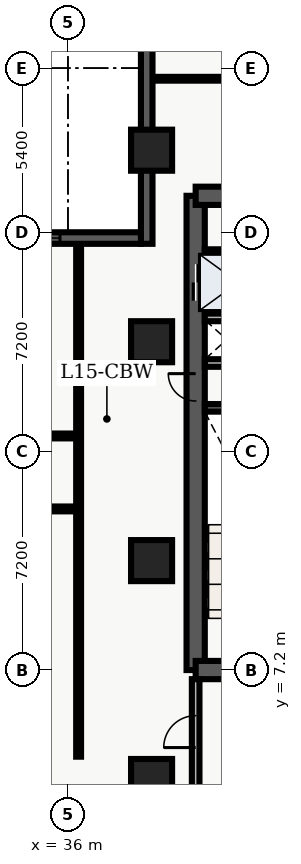
"""IFC4 building model, lengths in metres.
Left out: names, types, materials, properties, quantities, classifications, styles, units other than length and angle.
Written with IfcOpenShell. Run it as: python <this file> out.ifc"""

import sys

from ifc_helpers import new_model, entity, si_unit, converted_unit, direction, frame, origin_with_axes, origin_2d_with_axis, place, context, subcontext, project, spatial, polyline, rectangle, outline, extrude, element, fill, save


model = new_model("IFC4")
c1 = context("Model", 3, precision=1e-05, world=origin_with_axes(), true_north=direction((0.0, 1.0)))
c2 = subcontext(c1, "Body", "Model", "MODEL_VIEW")
j1 = project(units=[si_unit("LENGTHUNIT", "METRE"), converted_unit("PLANEANGLEUNIT", "DEGREE", entity("IfcPlaneAngleMeasure", 0.017), si_unit("PLANEANGLEUNIT", "RADIAN"), dimensions=[0, 0, 0, 0, 0, 0, 0])], contexts=[c1])
p1 = place(None, origin_with_axes())
s1 = spatial("IfcSite", under=j1, at=p1, CompositionType="ELEMENT")
p2 = place(p1, origin_with_axes())
s2 = spatial("IfcBuilding", under=s1, at=p2, CompositionType="ELEMENT")
p3 = place(p2, frame((0.0, 0.0, 63.9), z_axis=(0.0, 0.0, 1.0), x_axis=(1.0, 0.0, 0.0)))
s3 = spatial("IfcBuildingStorey", under=s2, at=p3, CompositionType="ELEMENT", Elevation=63.9)
p4 = place(p3, frame((40.2, 7.2, 0.0), z_axis=(0.0, 0.0, 1.0), x_axis=(0.0, 1.0, 0.0)))
e1 = element("IfcWall", 1, at=p4, inside=s3, PredefinedType="SHEAR", context=c2, shape_type="SweptSolid", body=[
    extrude(outline(polyline([(0.0, -0.3), (15.6, -0.3), (15.6, 0.3), (0.0, 0.3), (0.0, -0.3)])), origin_with_axes(), (0.0, 0.0, 1.0), 3.66),
])
p5 = place(p4, frame((12.75, 0.0, 0.0), z_axis=(0.0, 0.0, 1.0), x_axis=(1.0, 0.0, 0.0)))
e2 = element("IfcOpeningElement", 2, at=p5, cuts=e1, PredefinedType="OPENING", context=c2, shape_type="SweptSolid", body=[
    extrude(rectangle(XDim=1.2, YDim=0.62, at=origin_2d_with_axis()), origin_with_axes(), (0.0, 0.0, 1.0), 2.15),
])
p6 = place(p4, frame((9.3, 0.0, 0.0), z_axis=(0.0, 0.0, 1.0), x_axis=(1.0, 0.0, 0.0)))
e3 = element("IfcOpeningElement", 3, at=p6, cuts=e1, PredefinedType="OPENING", context=c2, shape_type="SweptSolid", body=[
    extrude(rectangle(XDim=0.9, YDim=0.62, at=origin_2d_with_axis()), origin_with_axes(), (0.0, 0.0, 1.0), 2.15),
])
p7 = place(p3, frame((40.2, 7.2, 0.0), z_axis=(0.0, 0.0, 1.0), x_axis=(1.0, 0.0, 0.0)))
e4 = element("IfcWall", 4, at=p7, inside=s3, PredefinedType="SHEAR", context=c2, shape_type="SweptSolid", body=[
    extrude(outline(polyline([(0.0, -0.3), (7.85, -0.3), (7.85, 0.3), (0.0, 0.3), (0.0, -0.3)])), origin_with_axes(), (0.0, 0.0, 1.0), 3.66),
])
p8 = place(p7, frame((2.175, 0.0, 0.0), z_axis=(0.0, 0.0, 1.0), x_axis=(1.0, 0.0, 0.0)))
e5 = element("IfcOpeningElement", 5, at=p8, cuts=e4, PredefinedType="OPENING", context=c2, shape_type="SweptSolid", body=[
    extrude(rectangle(XDim=1.05, YDim=0.62, at=origin_2d_with_axis()), origin_with_axes(), (0.0, 0.0, 1.0), 2.15),
])
p9 = place(p3, frame((40.2, 22.8, 0.0), z_axis=(0.0, 0.0, 1.0), x_axis=(1.0, 0.0, 0.0)))
e6 = element("IfcWall", 6, at=p9, inside=s3, PredefinedType="SHEAR", context=c2, shape_type="SweptSolid", body=[
    extrude(outline(polyline([(0.0, -0.3), (7.85, -0.3), (7.85, 0.3), (0.0, 0.3), (0.0, -0.3)])), origin_with_axes(), (0.0, 0.0, 1.0), 3.66),
])
p10 = place(p9, frame((5.775, 0.0, 0.0), z_axis=(0.0, 0.0, 1.0), x_axis=(1.0, 0.0, 0.0)))
e7 = element("IfcOpeningElement", 7, at=p10, cuts=e6, PredefinedType="OPENING", context=c2, shape_type="SweptSolid", body=[
    extrude(rectangle(XDim=1.05, YDim=0.62, at=origin_2d_with_axis()), origin_with_axes(), (0.0, 0.0, 1.0), 2.15),
])
p11 = place(p9, frame((2.15, 0.0, 0.0), z_axis=(0.0, 0.0, 1.0), x_axis=(1.0, 0.0, 0.0)))
e8 = element("IfcOpeningElement", 8, at=p11, cuts=e6, PredefinedType="OPENING", context=c2, shape_type="SweptSolid", body=[
    extrude(rectangle(XDim=0.9, YDim=0.62, at=origin_2d_with_axis()), origin_with_axes(), (0.0, 0.0, 1.0), 2.15),
])
p12 = place(p3, frame((40.5, 15.825, 0.0), z_axis=(0.0, 0.0, 1.0), x_axis=(1.0, 0.0, 0.0)))
e9 = element("IfcWall", 9, at=p12, inside=s3, PredefinedType="SHEAR", context=c2, shape_type="SweptSolid", body=[
    extrude(outline(polyline([(0.0, -0.125), (3.5, -0.125), (3.5, 0.125), (0.0, 0.125), (0.0, -0.125)])), origin_with_axes(), (0.0, 0.0, 1.0), 3.66),
])
p13 = place(p3, frame((40.5, 17.3, 0.0), z_axis=(0.0, 0.0, 1.0), x_axis=(1.0, 0.0, 0.0)))
e10 = element("IfcWall", 10, at=p13, inside=s3, PredefinedType="SOLIDWALL", context=c2, shape_type="SweptSolid", body=[
    extrude(outline(polyline([(0.0, -0.125), (3.5, -0.125), (3.5, 0.125), (0.0, 0.125), (0.0, -0.125)])), origin_with_axes(), (0.0, 0.0, 1.0), 2.7),
])
p14 = place(p13, frame((2.4, 0.0, 0.0), z_axis=(0.0, 0.0, 1.0), x_axis=(1.0, 0.0, 0.0)))
e11 = element("IfcOpeningElement", 11, at=p14, cuts=e10, PredefinedType="OPENING", context=c2, shape_type="SweptSolid", body=[
    extrude(rectangle(XDim=0.9, YDim=0.27, at=origin_2d_with_axis()), origin_with_axes(), (0.0, 0.0, 1.0), 2.15),
])
p15 = place(p3, frame((40.5, 18.8, 0.0), z_axis=(0.0, 0.0, 1.0), x_axis=(1.0, 0.0, 0.0)))
e12 = element("IfcWall", 12, at=p15, inside=s3, PredefinedType="SOLIDWALL", context=c2, shape_type="SweptSolid", body=[
    extrude(outline(polyline([(0.0, -0.125), (3.5, -0.125), (3.5, 0.125), (0.0, 0.125), (0.0, -0.125)])), origin_with_axes(), (0.0, 0.0, 1.0), 2.7),
])
p16 = place(p3, frame((40.2, 3.1, 0.0), z_axis=(0.0, 0.0, 1.0), x_axis=(0.0, 1.0, 0.0)))
e13 = element("IfcWall", 13, at=p16, inside=s3, PredefinedType="SOLIDWALL", context=c2, shape_type="SweptSolid", body=[
    extrude(outline(polyline([(0.0, -0.125), (3.8, -0.125), (3.8, 0.125), (0.0, 0.125), (0.0, -0.125)])), origin_with_axes(), (0.0, 0.0, 1.0), 2.7),
])
p17 = place(p16, frame((2.075, 0.0, 0.0), z_axis=(0.0, 0.0, 1.0), x_axis=(1.0, 0.0, 0.0)))
e14 = element("IfcOpeningElement", 14, at=p17, cuts=e13, PredefinedType="OPENING", context=c2, shape_type="SweptSolid", body=[
    extrude(rectangle(XDim=1.05, YDim=0.27, at=origin_2d_with_axis()), origin_with_axes(), (0.0, 0.0, 1.0), 2.15),
])
for number, where, z_axis, x_axis in (
    (15, (38.75, 3.6, 0.0), (0.0, 0.0, 1.0), (1.0, 0.0, 0.0)),
    (16, (38.75, 10.8, 0.0), (0.0, 0.0, 1.0), (1.0, 0.0, 0.0)),
    (17, (38.75, 18.0, 0.0), (0.0, 0.0, 1.0), (1.0, 0.0, 0.0)),
    (18, (38.75, 24.3, 0.0), (0.0, 0.0, 1.0), (1.0, 0.0, 0.0)),
):
    element("IfcColumn", number, at=place(p3, frame(where, z_axis=z_axis, x_axis=x_axis)), inside=s3, PredefinedType="COLUMN", context=c2, shape_type="SweptSolid", body=[
        extrude(rectangle(XDim=1.35, YDim=1.35, at=origin_2d_with_axis()), origin_with_axes(), (0.0, 0.0, 1.0), 3.9),
    ])
p18 = place(p3, frame((40.5, 20.96, 0.0), z_axis=(0.0, 0.0, 1.0), x_axis=(1.0, 0.0, 0.0)))
e19 = element("IfcWall", 19, at=p18, inside=s3, PredefinedType="PARTITIONING", context=c2, shape_type="SweptSolid", body=[
    extrude(outline(polyline([(0.0, -0.08), (3.5, -0.08), (3.5, 0.08), (0.0, 0.08), (0.0, -0.08)])), origin_with_axes(), (0.0, 0.0, 1.0), 2.7),
])
p19 = place(p3, frame((21.15, 12.5, 0.0), z_axis=(0.0, 0.0, 1.0), x_axis=(1.0, 0.0, 0.0)))
e20 = element("IfcWall", 20, at=p19, inside=s3, PredefinedType="PARTITIONING", context=c2, shape_type="SweptSolid", body=[
    extrude(outline(polyline([(0.0, -0.08), (15.2, -0.08), (15.2, 0.08), (0.0, 0.08), (0.0, -0.08)])), origin_with_axes(), (0.0, 0.0, 1.0), 2.7),
])
p20 = place(p19, frame((7.65, 0.0, 0.0), z_axis=(0.0, 0.0, 1.0), x_axis=(1.0, 0.0, 0.0)))
e21 = element("IfcOpeningElement", 21, at=p20, cuts=e20, PredefinedType="OPENING", context=c2, shape_type="SweptSolid", body=[
    extrude(rectangle(XDim=1.0, YDim=0.18, at=origin_2d_with_axis()), origin_with_axes(), (0.0, 0.0, 1.0), 2.15),
])
p21 = place(p3, frame((21.15, 14.9, 0.0), z_axis=(0.0, 0.0, 1.0), x_axis=(1.0, 0.0, 0.0)))
e22 = element("IfcWall", 22, at=p21, inside=s3, PredefinedType="PARTITIONING", context=c2, shape_type="SweptSolid", body=[
    extrude(outline(polyline([(0.0, -0.08), (15.2, -0.08), (15.2, 0.08), (0.0, 0.08), (0.0, -0.08)])), origin_with_axes(), (0.0, 0.0, 1.0), 2.7),
])
p22 = place(p21, frame((1.768, 0.0, 0.0), z_axis=(0.0, 0.0, 1.0), x_axis=(1.0, 0.0, 0.0)))
e23 = element("IfcOpeningElement", 23, at=p22, cuts=e22, PredefinedType="OPENING", context=c2, shape_type="SweptSolid", body=[
    extrude(rectangle(XDim=1.0, YDim=0.18, at=origin_2d_with_axis()), origin_with_axes(), (0.0, 0.0, 1.0), 2.15),
])
p23 = place(p21, frame((4.902, 0.0, 0.0), z_axis=(0.0, 0.0, 1.0), x_axis=(1.0, 0.0, 0.0)))
e24 = element("IfcOpeningElement", 24, at=p23, cuts=e22, PredefinedType="OPENING", context=c2, shape_type="SweptSolid", body=[
    extrude(rectangle(XDim=1.0, YDim=0.18, at=origin_2d_with_axis()), origin_with_axes(), (0.0, 0.0, 1.0), 2.15),
])
p24 = place(p21, frame((8.527, 0.0, 0.0), z_axis=(0.0, 0.0, 1.0), x_axis=(1.0, 0.0, 0.0)))
e25 = element("IfcOpeningElement", 25, at=p24, cuts=e22, PredefinedType="OPENING", context=c2, shape_type="SweptSolid", body=[
    extrude(rectangle(XDim=1.0, YDim=0.18, at=origin_2d_with_axis()), origin_with_axes(), (0.0, 0.0, 1.0), 2.15),
])
p25 = place(p21, frame((12.861, 0.0, 0.0), z_axis=(0.0, 0.0, 1.0), x_axis=(1.0, 0.0, 0.0)))
e26 = element("IfcOpeningElement", 26, at=p25, cuts=e22, PredefinedType="OPENING", context=c2, shape_type="SweptSolid", body=[
    extrude(rectangle(XDim=1.0, YDim=0.18, at=origin_2d_with_axis()), origin_with_axes(), (0.0, 0.0, 1.0), 2.15),
])
p26 = place(p3, frame((36.35, 4.35, 0.0), z_axis=(0.0, 0.0, 1.0), x_axis=(0.0, 1.0, 0.0)))
e27 = element("IfcWall", 27, at=p26, inside=s3, PredefinedType="PARTITIONING", context=c2, shape_type="SweptSolid", body=[
    extrude(outline(polyline([(0.0, -0.08), (16.95, -0.08), (16.95, 0.08), (0.0, 0.08), (0.0, -0.08)])), origin_with_axes(), (0.0, 0.0, 1.0), 2.7),
])
p27 = place(p3, frame((38.76, 26.65, 0.0), z_axis=(0.0, 0.0, 1.0), x_axis=(1.0, 0.0, 0.0)))
e28 = element("IfcWall", 28, at=p27, inside=s3, PredefinedType="PARTITIONING", context=c2, shape_type="SweptSolid", body=[
    extrude(outline(polyline([(0.0, -0.062), (20.88, -0.062), (20.88, 0.062), (0.0, 0.062), (0.0, -0.062)])), origin_with_axes(), (0.0, 0.0, 1.0), 2.7),
])
p28 = place(p27, frame((4.24, 0.0, 0.0), z_axis=(0.0, 0.0, 1.0), x_axis=(1.0, 0.0, 0.0)))
e29 = element("IfcOpeningElement", 29, at=p28, cuts=e28, PredefinedType="OPENING", context=c2, shape_type="SweptSolid", body=[
    extrude(rectangle(XDim=1.0, YDim=0.145, at=origin_2d_with_axis()), origin_with_axes(), (0.0, 0.0, 1.0), 2.15),
])
p29 = place(p3, frame((38.59, 21.22, 0.0), z_axis=(0.0, 0.0, 1.0), x_axis=(0.0, 1.0, 0.0)))
e30 = element("IfcWall", 30, at=p29, inside=s3, PredefinedType="SOLIDWALL", context=c2, shape_type="SweptSolid", body=[
    extrude(outline(polyline([(0.0, -0.19), (7.58, -0.19), (7.58, 0.19), (0.0, 0.19), (0.0, -0.19)])), origin_with_axes(), (0.0, 0.0, 1.0), 3.66),
])
p30 = place(p3, frame((21.22, 21.41, 0.0), z_axis=(0.0, 0.0, 1.0), x_axis=(1.0, 0.0, 0.0)))
e31 = element("IfcWall", 31, at=p30, inside=s3, PredefinedType="SOLIDWALL", context=c2, shape_type="SweptSolid", body=[
    extrude(outline(polyline([(0.0, -0.19), (17.18, -0.19), (17.18, 0.19), (0.0, 0.19), (0.0, -0.19)])), origin_with_axes(), (0.0, 0.0, 1.0), 3.66),
])
p31 = place(p30, frame((8.59, 0.0, 0.45), z_axis=(0.0, 0.0, 1.0), x_axis=(1.0, 0.0, 0.0)))
e32 = element("IfcOpeningElement", 32, at=p31, cuts=e31, PredefinedType="OPENING", context=c2, shape_type="SweptSolid", body=[
    extrude(rectangle(XDim=2.1, YDim=0.4, at=origin_2d_with_axis()), origin_with_axes(), (0.0, 0.0, 1.0), 2.2),
])
p32 = place(p30, frame((13.467, 0.0, 0.45), z_axis=(0.0, 0.0, 1.0), x_axis=(1.0, 0.0, 0.0)))
e33 = element("IfcOpeningElement", 33, at=p32, cuts=e31, PredefinedType="OPENING", context=c2, shape_type="SweptSolid", body=[
    extrude(rectangle(XDim=2.1, YDim=0.4, at=origin_2d_with_axis()), origin_with_axes(), (0.0, 0.0, 1.0), 2.2),
])
p33 = place(p4, frame((12.75, 0.0, 0.0), z_axis=(0.0, 0.0, 1.0), x_axis=(1.0, 0.0, 0.0)))
e34 = element("IfcDoor", 34, at=p33, inside=s3, OperationType="DOUBLE_DOOR_SLIDING", PredefinedType="DOOR", context=c2, shape_type="SweptSolid", body=[
    extrude(rectangle(XDim=1.2, YDim=0.09, at=origin_2d_with_axis()), origin_with_axes(), (0.0, 0.0, 1.0), 2.15),
])
fill(e2, e34)
p34 = place(p4, frame((9.3, 0.0, 0.0), z_axis=(0.0, 0.0, 1.0), x_axis=(1.0, 0.0, 0.0)))
e35 = element("IfcDoor", 35, at=p34, inside=s3, OperationType="SINGLE_SWING_RIGHT", PredefinedType="DOOR", context=c2, shape_type="SweptSolid", body=[
    extrude(rectangle(XDim=0.9, YDim=0.09, at=origin_2d_with_axis()), origin_with_axes(), (0.0, 0.0, 1.0), 2.15),
])
fill(e3, e35)
p35 = place(p16, frame((2.075, 0.0, 0.0), z_axis=(0.0, 0.0, 1.0), x_axis=(1.0, 0.0, 0.0)))
e36 = element("IfcDoor", 36, at=p35, inside=s3, OperationType="SINGLE_SWING_LEFT", PredefinedType="DOOR", context=c2, shape_type="SweptSolid", body=[
    extrude(rectangle(XDim=1.05, YDim=0.09, at=origin_2d_with_axis()), origin_with_axes(), (0.0, 0.0, 1.0), 2.15),
])
fill(e14, e36)
p36 = place(p30, frame((13.467, 0.0, 0.45), z_axis=(0.0, 0.0, 1.0), x_axis=(1.0, 0.0, 0.0)))
e37 = element("IfcWindow", 37, at=p36, inside=s3, PredefinedType="WINDOW", context=c2, shape_type="SweptSolid", body=[
    extrude(rectangle(XDim=2.1, YDim=0.09, at=origin_2d_with_axis()), origin_with_axes(), (0.0, 0.0, 1.0), 2.2),
])
fill(e33, e37)
save(model, sys.argv[1])
